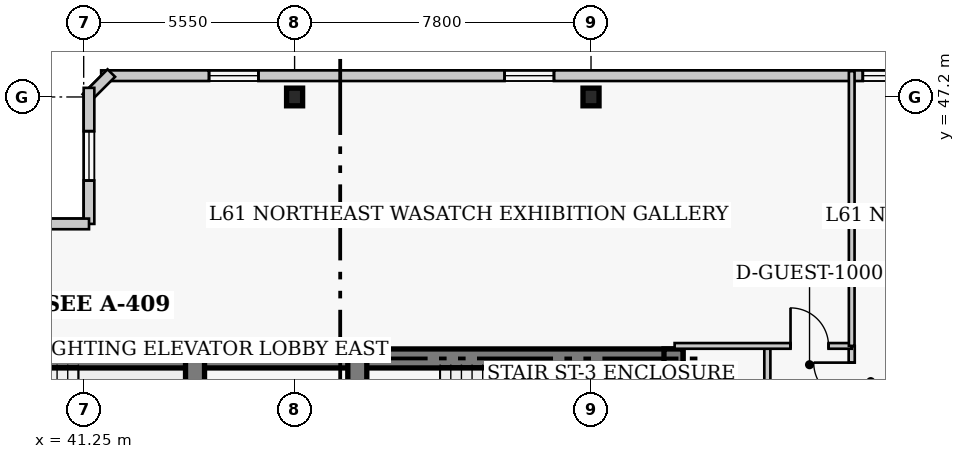
"""IFC4 building model, lengths in metres.
Left out: names, types, materials, properties, quantities, classifications, styles, units other than length and angle.
Written with IfcOpenShell. Run it as: python <this file> out.ifc"""

import sys

from ifc_helpers import new_model, si_unit, direction, frame, frame_2d, origin, origin_2d, place, context, subcontext, project, spatial, rectangle, i_section, extrude, element, fill, save


model = new_model("IFC4")
c1 = context("Model", 3, precision=1e-05, world=origin(), true_north=direction((0.0, 1.0)))
c2 = subcontext(c1, "Body", "Model", "MODEL_VIEW")
j1 = project(units=[si_unit("LENGTHUNIT", "METRE"), si_unit("PLANEANGLEUNIT", "RADIAN")], contexts=[c1])
p1 = place(None, origin())
s1 = spatial("IfcSite", under=j1, at=p1, CompositionType="ELEMENT")
p2 = place(p1, origin())
s2 = spatial("IfcBuilding", under=s1, at=p2, CompositionType="ELEMENT")
p3 = place(p2, frame((0.0, 0.0, 245.4)))
s3 = spatial("IfcBuildingStorey", under=s2, at=p3, CompositionType="ELEMENT", Elevation=245.4)
p4 = place(p3, frame((35.85, 40.32, 0.0), z_axis=(0.0, 0.0, 1.0), x_axis=(1.0, 0.0, 0.0)))
e1 = element("IfcWall", 1, at=p4, inside=s3, PredefinedType="SHEAR", context=c2, shape_type="SweptSolid", body=[
    extrude(rectangle(XDim=12.6, YDim=0.5, at=frame_2d((6.3, 0.0))), origin(), (0.0, 0.0, 1.0), 4.0),
])
p5 = place(p3, frame((48.45, 40.32, 0.0), z_axis=(0.0, 0.0, 1.0), x_axis=(1.0, 0.0, 0.0)))
e2 = element("IfcWall", 2, at=p5, inside=s3, PredefinedType="SHEAR", context=c2, shape_type="SweptSolid", body=[
    extrude(rectangle(XDim=8.57, YDim=0.5, at=frame_2d((4.285, 0.0))), origin(), (0.0, 0.0, 1.0), 4.0),
])
p6 = place(p3, frame((56.77, 27.05, 0.0), z_axis=(0.0, 0.0, 1.0), x_axis=(0.0, 1.0, 0.0)))
e3 = element("IfcWall", 3, at=p6, inside=s3, PredefinedType="SHEAR", context=c2, shape_type="SweptSolid", body=[
    extrude(rectangle(XDim=13.52, YDim=0.5, at=frame_2d((6.76, 0.0))), origin(), (0.0, 0.0, 1.0), 4.0),
])
p7 = place(p3, frame((44.18, 36.37, 0.0), z_axis=(0.0, 0.0, 1.0), x_axis=(0.0, 1.0, 0.0)))
e4 = element("IfcWall", 4, at=p7, inside=s3, PredefinedType="SHEAR", context=c2, shape_type="SweptSolid", body=[
    extrude(rectangle(XDim=3.95, YDim=0.5, at=frame_2d((1.975, 0.0))), origin(), (0.0, 0.0, 1.0), 4.0),
])
p8 = place(p3, frame((48.45, 32.5, 0.0), z_axis=(0.0, 0.0, 1.0), x_axis=(0.0, 1.0, 0.0)))
e5 = element("IfcWall", 5, at=p8, inside=s3, PredefinedType="SHEAR", context=c2, shape_type="SweptSolid", body=[
    extrude(rectangle(XDim=7.82, YDim=0.5, at=frame_2d((3.91, 0.0))), origin(), (0.0, 0.0, 1.0), 4.0),
])
p9 = place(p8, frame((5.7, 0.0, 0.0)))
e6 = element("IfcOpeningElement", 6, at=p9, cuts=e5, PredefinedType="OPENING", context=c2, shape_type="SweptSolid", body=[
    extrude(rectangle(XDim=1.1, YDim=2.15, at=frame_2d((0.55, 1.075))), frame((0.0, 0.26, 0.0), z_axis=(0.0, -1.0, 0.0), x_axis=(1.0, 0.0, 0.0)), (0.0, 0.0, 1.0), 0.52),
])
for number, where, z_axis, x_axis in (
    (7, (46.8, 47.2, 0.0), (0.0, 0.0, 1.0), (1.0, 0.0, 0.0)),
    (8, (54.6, 47.2, 0.0), (0.0, 0.0, 1.0), (1.0, 0.0, 0.0)),
):
    element("IfcColumn", number, at=place(p3, frame(where, z_axis=z_axis, x_axis=x_axis)), inside=s3, PredefinedType="COLUMN", context=c2, shape_type="SweptSolid", body=[
        extrude(i_section(OverallWidth=0.422, OverallDepth=0.465, WebThickness=0.045, FlangeThickness=0.073, FilletRadius=0.017, at=origin_2d()), origin(), (0.0, 0.0, 1.0), 4.0),
    ])
p10 = place(p3, frame((66.54, 47.76, 0.0), z_axis=(0.0, 0.0, 1.0), x_axis=(-1.0, 0.0, 0.0)))
e9 = element("IfcWall", 9, at=p10, inside=s3, PredefinedType="SOLIDWALL", context=c2, shape_type="SweptSolid", body=[
    extrude(rectangle(XDim=24.83, YDim=0.28, at=frame_2d((12.415, 0.0))), origin(), (0.0, 0.0, 1.0), 3.76),
])
p11 = place(p10, frame((3.488, 0.0, 0.85)))
e10 = element("IfcOpeningElement", 10, at=p11, cuts=e9, PredefinedType="OPENING", context=c2, shape_type="SweptSolid", body=[
    extrude(rectangle(XDim=1.3, YDim=1.7, at=frame_2d((0.65, 0.85))), frame((0.0, 0.15, 0.0), z_axis=(0.0, -1.0, 0.0), x_axis=(1.0, 0.0, 0.0)), (0.0, 0.0, 1.0), 0.3),
])
p12 = place(p10, frame((12.915, 0.0, 0.85)))
e11 = element("IfcOpeningElement", 11, at=p12, cuts=e9, PredefinedType="OPENING", context=c2, shape_type="SweptSolid", body=[
    extrude(rectangle(XDim=1.3, YDim=1.7, at=frame_2d((0.65, 0.85))), frame((0.0, 0.15, 0.0), z_axis=(0.0, -1.0, 0.0), x_axis=(1.0, 0.0, 0.0)), (0.0, 0.0, 1.0), 0.3),
])
p13 = place(p10, frame((20.692, 0.0, 0.85)))
e12 = element("IfcOpeningElement", 12, at=p13, cuts=e9, PredefinedType="OPENING", context=c2, shape_type="SweptSolid", body=[
    extrude(rectangle(XDim=1.3, YDim=1.7, at=frame_2d((0.65, 0.85))), frame((0.0, 0.15, 0.0), z_axis=(0.0, -1.0, 0.0), x_axis=(1.0, 0.0, 0.0)), (0.0, 0.0, 1.0), 0.3),
])
p14 = place(p3, frame((41.977, 47.829, 0.0), z_axis=(0.0, 0.0, 1.0), x_axis=(-0.706975312048, -0.707238225886, 0.0)))
e13 = element("IfcWall", 13, at=p14, inside=s3, PredefinedType="SOLIDWALL", context=c2, shape_type="SweptSolid", body=[
    extrude(rectangle(XDim=0.929, YDim=0.28, at=frame_2d((0.464, 0.0))), origin(), (0.0, 0.0, 1.0), 3.76),
])
p15 = place(p3, frame((41.39, 47.44, 0.0), z_axis=(0.0, 0.0, 1.0), x_axis=(0.0, -1.0, 0.0)))
e14 = element("IfcWall", 14, at=p15, inside=s3, PredefinedType="SOLIDWALL", context=c2, shape_type="SweptSolid", body=[
    extrude(rectangle(XDim=3.58, YDim=0.28, at=frame_2d((1.79, 0.0))), origin(), (0.0, 0.0, 1.0), 3.76),
])
p16 = place(p15, frame((1.14, 0.0, 0.85)))
e15 = element("IfcOpeningElement", 15, at=p16, cuts=e14, PredefinedType="OPENING", context=c2, shape_type="SweptSolid", body=[
    extrude(rectangle(XDim=1.3, YDim=1.7, at=frame_2d((0.65, 0.85))), frame((0.0, 0.15, 0.0), z_axis=(0.0, -1.0, 0.0), x_axis=(1.0, 0.0, 0.0)), (0.0, 0.0, 1.0), 0.3),
])
p17 = place(p3, frame((41.39, 43.86, 0.0), z_axis=(0.0, 0.0, 1.0), x_axis=(-1.0, 0.0, 0.0)))
e16 = element("IfcWall", 16, at=p17, inside=s3, PredefinedType="SOLIDWALL", context=c2, shape_type="SweptSolid", body=[
    extrude(rectangle(XDim=4.78, YDim=0.28, at=frame_2d((2.39, 0.0))), origin(), (0.0, 0.0, 1.0), 3.76),
])
p18 = place(p17, frame((1.74, 0.0, 0.85)))
e17 = element("IfcOpeningElement", 17, at=p18, cuts=e16, PredefinedType="OPENING", context=c2, shape_type="SweptSolid", body=[
    extrude(rectangle(XDim=1.3, YDim=1.7, at=frame_2d((0.65, 0.85))), frame((0.0, 0.15, 0.0), z_axis=(0.0, -1.0, 0.0), x_axis=(1.0, 0.0, 0.0)), (0.0, 0.0, 1.0), 0.3),
])
p19 = place(p3, frame((61.46, 23.55, 0.0), z_axis=(0.0, 0.0, 1.0), x_axis=(0.0, 1.0, 0.0)))
e18 = element("IfcWall", 18, at=p19, inside=s3, PredefinedType="PARTITIONING", context=c2, shape_type="SweptSolid", body=[
    extrude(rectangle(XDim=17.1, YDim=0.16, at=frame_2d((8.55, 0.0))), origin(), (0.0, 0.0, 1.0), 3.76),
])
p20 = place(p19, frame((2.15, 0.0, 0.0)))
e19 = element("IfcOpeningElement", 19, at=p20, cuts=e18, PredefinedType="OPENING", context=c2, shape_type="SweptSolid", body=[
    extrude(rectangle(XDim=0.95, YDim=2.1, at=frame_2d((0.475, 1.05))), frame((0.0, 0.09, 0.0), z_axis=(0.0, -1.0, 0.0), x_axis=(1.0, 0.0, 0.0)), (0.0, 0.0, 1.0), 0.18),
])
p21 = place(p19, frame((8.825, 0.0, 0.0)))
e20 = element("IfcOpeningElement", 20, at=p21, cuts=e18, PredefinedType="OPENING", context=c2, shape_type="SweptSolid", body=[
    extrude(rectangle(XDim=0.95, YDim=2.1, at=frame_2d((0.475, 1.05))), frame((0.0, 0.09, 0.0), z_axis=(0.0, -1.0, 0.0), x_axis=(1.0, 0.0, 0.0)), (0.0, 0.0, 1.0), 0.18),
])
p22 = place(p19, frame((15.66, 0.0, 0.0)))
e21 = element("IfcOpeningElement", 21, at=p22, cuts=e18, PredefinedType="OPENING", context=c2, shape_type="SweptSolid", body=[
    extrude(rectangle(XDim=1.0, YDim=2.15, at=frame_2d((0.5, 1.075))), frame((0.0, 0.09, 0.0), z_axis=(0.0, -1.0, 0.0), x_axis=(1.0, 0.0, 0.0)), (0.0, 0.0, 1.0), 0.18),
])
p23 = place(p3, frame((59.24, 25.71, 0.0), z_axis=(0.0, 0.0, 1.0), x_axis=(0.0, 1.0, 0.0)))
e22 = element("IfcWall", 22, at=p23, inside=s3, PredefinedType="PARTITIONING", context=c2, shape_type="SweptSolid", body=[
    extrude(rectangle(XDim=14.94, YDim=0.16, at=frame_2d((7.47, 0.0))), origin(), (0.0, 0.0, 1.0), 3.76),
])
p24 = place(p3, frame((56.8, 40.65, 0.0), z_axis=(0.0, 0.0, 1.0), x_axis=(1.0, 0.0, 0.0)))
e23 = element("IfcWall", 23, at=p24, inside=s3, PredefinedType="PARTITIONING", context=c2, shape_type="SweptSolid", body=[
    extrude(rectangle(XDim=4.66, YDim=0.15, at=frame_2d((2.33, 0.0))), origin(), (0.0, 0.0, 1.0), 3.76),
])
p25 = place(p24, frame((3.05, 0.0, 0.0)))
e24 = element("IfcOpeningElement", 24, at=p25, cuts=e23, PredefinedType="OPENING", context=c2, shape_type="SweptSolid", body=[
    extrude(rectangle(XDim=1.0, YDim=2.15, at=frame_2d((0.5, 1.075))), frame((0.0, 0.085, 0.0), z_axis=(0.0, -1.0, 0.0), x_axis=(1.0, 0.0, 0.0)), (0.0, 0.0, 1.0), 0.17),
])
p26 = place(p3, frame((61.46, 40.65, 0.0), z_axis=(0.0, 0.0, 1.0), x_axis=(0.0, 1.0, 0.0)))
e25 = element("IfcWall", 25, at=p26, inside=s3, PredefinedType="PARTITIONING", context=c2, shape_type="SweptSolid", body=[
    extrude(rectangle(XDim=7.23, YDim=0.15, at=frame_2d((3.615, 0.0))), origin(), (0.0, 0.0, 1.0), 3.76),
])
p27 = place(p11, origin())
e26 = element("IfcWindow", 26, at=p27, inside=s3, PartitioningType="SINGLE_PANEL", PredefinedType="WINDOW", context=c2, shape_type="SweptSolid", body=[
    extrude(rectangle(XDim=1.3, YDim=1.7, at=frame_2d((0.65, 0.85))), frame((0.0, 0.03, 0.0), z_axis=(0.0, -1.0, 0.0), x_axis=(1.0, 0.0, 0.0)), (0.0, 0.0, 1.0), 0.06),
])
fill(e10, e26)
p28 = place(p12, origin())
e27 = element("IfcWindow", 27, at=p28, inside=s3, PartitioningType="SINGLE_PANEL", PredefinedType="WINDOW", context=c2, shape_type="SweptSolid", body=[
    extrude(rectangle(XDim=1.3, YDim=1.7, at=frame_2d((0.65, 0.85))), frame((0.0, 0.03, 0.0), z_axis=(0.0, -1.0, 0.0), x_axis=(1.0, 0.0, 0.0)), (0.0, 0.0, 1.0), 0.06),
])
fill(e11, e27)
p29 = place(p13, origin())
e28 = element("IfcWindow", 28, at=p29, inside=s3, PartitioningType="SINGLE_PANEL", PredefinedType="WINDOW", context=c2, shape_type="SweptSolid", body=[
    extrude(rectangle(XDim=1.3, YDim=1.7, at=frame_2d((0.65, 0.85))), frame((0.0, 0.03, 0.0), z_axis=(0.0, -1.0, 0.0), x_axis=(1.0, 0.0, 0.0)), (0.0, 0.0, 1.0), 0.06),
])
fill(e12, e28)
p30 = place(p16, origin())
e29 = element("IfcWindow", 29, at=p30, inside=s3, PartitioningType="SINGLE_PANEL", PredefinedType="WINDOW", context=c2, shape_type="SweptSolid", body=[
    extrude(rectangle(XDim=1.3, YDim=1.7, at=frame_2d((0.65, 0.85))), frame((0.0, 0.03, 0.0), z_axis=(0.0, -1.0, 0.0), x_axis=(1.0, 0.0, 0.0)), (0.0, 0.0, 1.0), 0.06),
])
fill(e15, e29)
p31 = place(p25, origin())
e30 = element("IfcDoor", 30, at=p31, inside=s3, OperationType="SINGLE_SWING_LEFT", PredefinedType="DOOR", context=c2, shape_type="SweptSolid", body=[
    extrude(rectangle(XDim=1.0, YDim=2.15, at=frame_2d((0.5, 1.075))), frame((0.0, 0.025, 0.0), z_axis=(0.0, -1.0, 0.0), x_axis=(1.0, 0.0, 0.0)), (0.0, 0.0, 1.0), 0.05),
])
fill(e24, e30)
p32 = place(p22, origin())
e31 = element("IfcDoor", 31, at=p32, inside=s3, OperationType="SINGLE_SWING_RIGHT", PredefinedType="DOOR", context=c2, shape_type="SweptSolid", body=[
    extrude(rectangle(XDim=1.0, YDim=2.15, at=frame_2d((0.5, 1.075))), frame((0.0, 0.025, 0.0), z_axis=(0.0, -1.0, 0.0), x_axis=(1.0, 0.0, 0.0)), (0.0, 0.0, 1.0), 0.05),
])
fill(e21, e31)
save(model, sys.argv[1])
